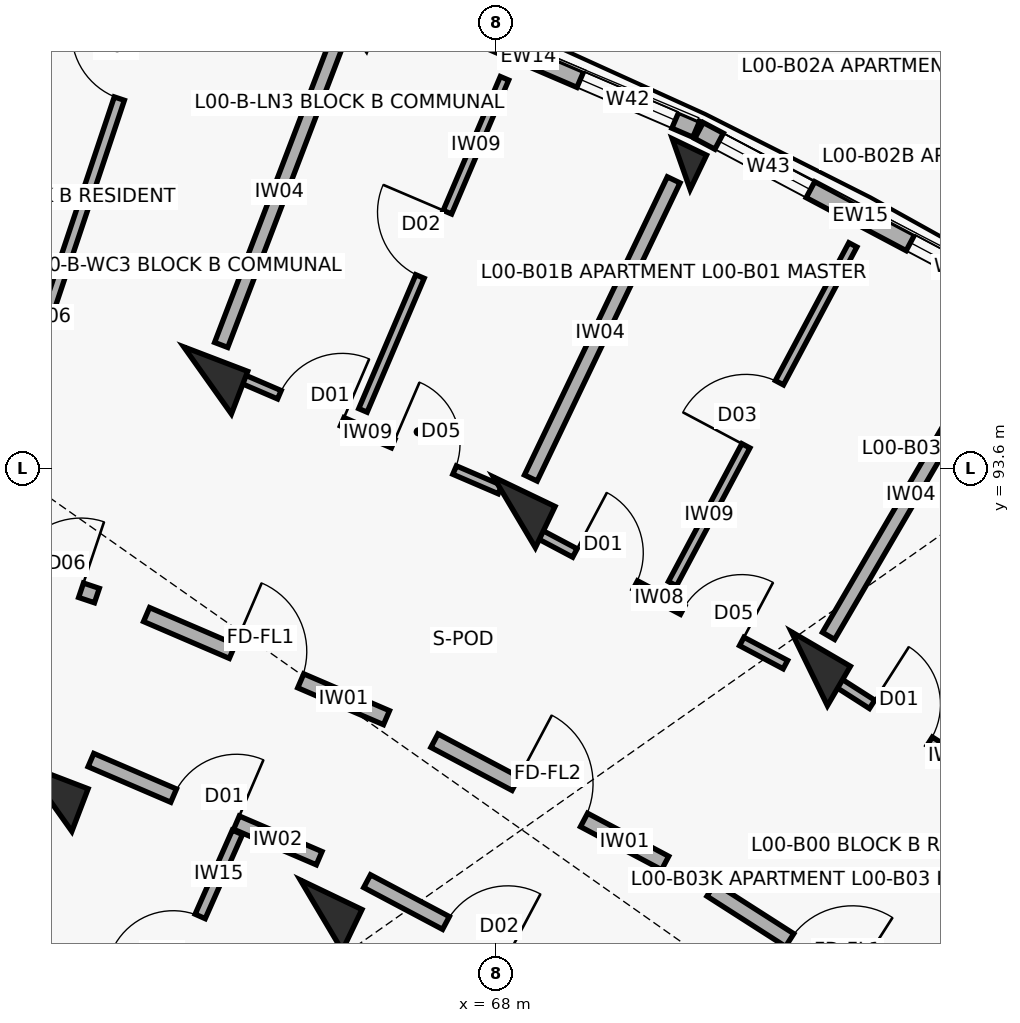
"""IFC4 building model, lengths in metres.
Left out: names, types, materials, properties, quantities, classifications, styles, units other than length and angle.
Written with IfcOpenShell. Run it as: python <this file> out.ifc"""

import sys

from ifc_helpers import new_model, si_unit, direction, frame, frame_2d, origin, origin_2d, place, context, subcontext, project, spatial, rectangle, extrude, element, fill, save


model = new_model("IFC4")
c1 = context("Model", 3, precision=1e-05, world=origin(), true_north=direction((0.0, 1.0)))
c2 = subcontext(c1, "Body", "Model", "MODEL_VIEW")
j1 = project(units=[si_unit("LENGTHUNIT", "METRE"), si_unit("PLANEANGLEUNIT", "RADIAN")], contexts=[c1])
p1 = place(None, origin())
s1 = spatial("IfcSite", under=j1, at=p1, CompositionType="ELEMENT")
p2 = place(p1, origin())
s2 = spatial("IfcBuilding", under=s1, at=p2, CompositionType="ELEMENT")
p3 = place(p2, origin())
s3 = spatial("IfcBuildingStorey", under=s2, at=p3, CompositionType="ELEMENT", Elevation=0.0)
for number, where, z_axis, x_axis in (
    (1, (62.111, 89.261, 0.0), (0.0, 0.0, 1.0), (0.357, 0.934, 0.0)),
    (2, (64.21, 94.753, 0.0), (0.0, 0.0, 1.0), (0.357, 0.934, 0.0)),
    (3, (65.706, 87.716, 0.0), (0.0, 0.0, 1.0), (0.432, 0.902, 0.0)),
    (4, (68.246, 93.019, 0.0), (0.0, 0.0, 1.0), (0.432, 0.902, 0.0)),
):
    element("IfcColumn", number, at=place(p3, frame(where, z_axis=z_axis, x_axis=x_axis)), inside=s3, PredefinedType="COLUMN", context=c2, shape_type="SweptSolid", body=[
        extrude(rectangle(XDim=0.6, YDim=0.9, at=origin_2d()), origin(), (0.0, 0.0, 1.0), 4.5),
    ])
p4 = place(p3, frame((70.441, 97.6, 0.0), z_axis=(0.0, 0.0, 1.0), x_axis=(0.432085748802, 0.901832526405, 0.0)))
e5 = element("IfcColumn", 5, at=p4, inside=s3, PredefinedType="COLUMN", context=c2, shape_type="SweptSolid", body=[
    extrude(rectangle(XDim=0.5, YDim=0.5, at=origin_2d()), origin(), (0.0, 0.0, 1.0), 4.5),
])
p5 = place(p3, frame((72.127, 90.96, 0.0), z_axis=(0.0, 0.0, 1.0), x_axis=(0.504226211181, 0.863571611366, 0.0)))
e6 = element("IfcColumn", 6, at=p5, inside=s3, PredefinedType="COLUMN", context=c2, shape_type="SweptSolid", body=[
    extrude(rectangle(XDim=0.6, YDim=0.9, at=origin_2d()), origin(), (0.0, 0.0, 1.0), 4.5),
])
p6 = place(p3, frame((66.221, 99.958, 0.0), z_axis=(0.0, 0.0, 1.0), x_axis=(0.918711189033, -0.394930058548, 0.0)))
e7 = element("IfcWall", 7, at=p6, inside=s3, PredefinedType="SOLIDWALL", context=c2, shape_type="SweptSolid", body=[
    extrude(rectangle(XDim=4.809, YDim=0.228, at=frame_2d((2.404, 0.0))), origin(), (0.0, 0.0, 1.0), 3.45),
])
p7 = place(p6, frame((0.3, 0.0, 0.3)))
e8 = element("IfcOpeningElement", 8, at=p7, cuts=e7, PredefinedType="OPENING", context=c2, shape_type="SweptSolid", body=[
    extrude(rectangle(XDim=1.36, YDim=1.28, at=frame_2d((0.68, 0.64))), frame((0.0, 0.124, 0.0), z_axis=(0.0, -1.0, 0.0), x_axis=(1.0, 0.0, 0.0)), (0.0, 0.0, 1.0), 0.248),
])
p8 = place(p6, frame((3.149, 0.0, 0.3)))
e9 = element("IfcOpeningElement", 9, at=p8, cuts=e7, PredefinedType="OPENING", context=c2, shape_type="SweptSolid", body=[
    extrude(rectangle(XDim=1.36, YDim=1.28, at=frame_2d((0.68, 0.64))), frame((0.0, 0.124, 0.0), z_axis=(0.0, -1.0, 0.0), x_axis=(1.0, 0.0, 0.0)), (0.0, 0.0, 1.0), 0.248),
])
p9 = place(p3, frame((70.675, 98.042, 0.0), z_axis=(0.0, 0.0, 1.0), x_axis=(0.883448093208, -0.468529045639, 0.0)))
e10 = element("IfcWall", 10, at=p9, inside=s3, PredefinedType="SOLIDWALL", context=c2, shape_type="SweptSolid", body=[
    extrude(rectangle(XDim=4.809, YDim=0.238, at=frame_2d((2.405, 0.0))), origin(), (0.0, 0.0, 1.0), 3.45),
])
p10 = place(p9, frame((0.3, 0.0, 0.3)))
e11 = element("IfcOpeningElement", 11, at=p10, cuts=e10, PredefinedType="OPENING", context=c2, shape_type="SweptSolid", body=[
    extrude(rectangle(XDim=1.36, YDim=1.42, at=frame_2d((0.68, 0.71))), frame((0.0, 0.129, 0.0), z_axis=(0.0, -1.0, 0.0), x_axis=(1.0, 0.0, 0.0)), (0.0, 0.0, 1.0), 0.258),
])
p11 = place(p9, frame((3.149, 0.0, 0.3)))
e12 = element("IfcOpeningElement", 12, at=p11, cuts=e10, PredefinedType="OPENING", context=c2, shape_type="SweptSolid", body=[
    extrude(rectangle(XDim=1.36, YDim=1.42, at=frame_2d((0.68, 0.71))), frame((0.0, 0.129, 0.0), z_axis=(0.0, -1.0, 0.0), x_axis=(1.0, 0.0, 0.0)), (0.0, 0.0, 1.0), 0.258),
])
p12 = place(p3, frame((59.497, 93.018, 0.0), z_axis=(0.0, 0.0, 1.0), x_axis=(0.947863007629, -0.318678080151, 0.0)))
e13 = element("IfcWall", 13, at=p12, inside=s3, PredefinedType="SOLIDWALL", context=c2, shape_type="SweptSolid", body=[
    extrude(rectangle(XDim=3.436, YDim=0.2, at=frame_2d((1.718, 0.0))), origin(), (0.0, 0.0, 1.0), 3.34),
])
p13 = place(p12, frame((0.28, 0.0, 0.0)))
e14 = element("IfcOpeningElement", 14, at=p13, cuts=e13, PredefinedType="OPENING", context=c2, shape_type="SweptSolid", body=[
    extrude(rectangle(XDim=1.12, YDim=2.15, at=frame_2d((0.56, 1.075))), frame((0.0, 0.11, 0.0), z_axis=(0.0, -1.0, 0.0), x_axis=(1.0, 0.0, 0.0)), (0.0, 0.0, 1.0), 0.22),
])
p14 = place(p12, frame((2.266, 0.0, 0.0)))
e15 = element("IfcOpeningElement", 15, at=p14, cuts=e13, PredefinedType="OPENING", context=c2, shape_type="SweptSolid", body=[
    extrude(rectangle(XDim=0.95, YDim=2.1, at=frame_2d((0.475, 1.05))), frame((0.0, 0.11, 0.0), z_axis=(0.0, -1.0, 0.0), x_axis=(1.0, 0.0, 0.0)), (0.0, 0.0, 1.0), 0.22),
])
p15 = place(p3, frame((61.13, 92.724, 0.0), z_axis=(0.0, 0.0, 1.0), x_axis=(0.317204178278, 0.948357268798, 0.0)))
e16 = element("IfcWall", 16, at=p15, inside=s3, PredefinedType="PARTITIONING", context=c2, shape_type="SweptSolid", body=[
    extrude(rectangle(XDim=7.95, YDim=0.14, at=frame_2d((3.975, 0.0))), origin(), (0.0, 0.0, 1.0), 3.34),
])
p16 = place(p15, frame((6.05, 0.0, 0.0)))
e17 = element("IfcOpeningElement", 17, at=p16, cuts=e16, PredefinedType="OPENING", context=c2, shape_type="SweptSolid", body=[
    extrude(rectangle(XDim=0.92, YDim=2.1, at=frame_2d((0.46, 1.05))), frame((0.0, 0.08, 0.0), z_axis=(0.0, -1.0, 0.0), x_axis=(1.0, 0.0, 0.0)), (0.0, 0.0, 1.0), 0.16),
])
p17 = place(p3, frame((63.407, 91.673, 0.0), z_axis=(0.0, 0.0, 1.0), x_axis=(0.918718172399, -0.394913813008, 0.0)))
e18 = element("IfcWall", 18, at=p17, inside=s3, PredefinedType="SOLIDWALL", context=c2, shape_type="SweptSolid", body=[
    extrude(rectangle(XDim=3.436, YDim=0.2, at=frame_2d((1.718, 0.0))), origin(), (0.0, 0.0, 1.0), 3.34),
])
p18 = place(p17, frame((1.228, 0.0, 0.0)))
e19 = element("IfcOpeningElement", 19, at=p18, cuts=e18, PredefinedType="OPENING", context=c2, shape_type="SweptSolid", body=[
    extrude(rectangle(XDim=0.98, YDim=2.15, at=frame_2d((0.49, 1.075))), frame((0.0, 0.11, 0.0), z_axis=(0.0, -1.0, 0.0), x_axis=(1.0, 0.0, 0.0)), (0.0, 0.0, 1.0), 0.22),
])
p19 = place(p3, frame((62.675, 89.758, 0.0), z_axis=(0.0, 0.0, 1.0), x_axis=(0.918723391052, -0.394901672235, 0.0)))
e20 = element("IfcWall", 20, at=p19, inside=s3, PredefinedType="SOLIDWALL", context=c2, shape_type="SweptSolid", body=[
    extrude(rectangle(XDim=3.269, YDim=0.19, at=frame_2d((1.634, 0.0))), origin(), (0.0, 0.0, 1.0), 3.34),
])
p20 = place(p19, frame((1.184, 0.0, 0.0)))
e21 = element("IfcOpeningElement", 21, at=p20, cuts=e20, PredefinedType="OPENING", context=c2, shape_type="SweptSolid", body=[
    extrude(rectangle(XDim=0.9, YDim=2.1, at=frame_2d((0.45, 1.05))), frame((0.0, 0.105, 0.0), z_axis=(0.0, -1.0, 0.0), x_axis=(1.0, 0.0, 0.0)), (0.0, 0.0, 1.0), 0.21),
])
p21 = place(p3, frame((63.267, 85.79, 0.0), z_axis=(0.0, 0.0, 1.0), x_axis=(0.404545283439, 0.91451796792, 0.0)))
e22 = element("IfcWall", 22, at=p21, inside=s3, PredefinedType="PARTITIONING", context=c2, shape_type="SweptSolid", body=[
    extrude(rectangle(XDim=3.3, YDim=0.145, at=frame_2d((1.65, 0.0))), origin(), (0.0, 0.0, 1.0), 3.34),
])
p22 = place(p21, frame((1.21, 0.0, 0.0)))
e23 = element("IfcOpeningElement", 23, at=p22, cuts=e22, PredefinedType="OPENING", context=c2, shape_type="SweptSolid", body=[
    extrude(rectangle(XDim=0.88, YDim=2.1, at=frame_2d((0.44, 1.05))), frame((0.0, 0.083, 0.0), z_axis=(0.0, -1.0, 0.0), x_axis=(1.0, 0.0, 0.0)), (0.0, 0.0, 1.0), 0.165),
])
p23 = place(p3, frame((64.557, 94.822, 0.0), z_axis=(0.0, 0.0, 1.0), x_axis=(0.918726854017, -0.394893615684, 0.0)))
e24 = element("IfcWall", 24, at=p23, inside=s3, PredefinedType="PARTITIONING", context=c2, shape_type="SweptSolid", body=[
    extrude(rectangle(XDim=3.81, YDim=0.12, at=frame_2d((1.905, 0.0))), origin(), (0.0, 0.0, 1.0), 3.34),
])
p24 = place(p23, frame((0.65, 0.0, 0.0)))
e25 = element("IfcOpeningElement", 25, at=p24, cuts=e24, PredefinedType="OPENING", context=c2, shape_type="SweptSolid", body=[
    extrude(rectangle(XDim=0.9, YDim=2.1, at=frame_2d((0.45, 1.05))), frame((0.0, 0.07, 0.0), z_axis=(0.0, -1.0, 0.0), x_axis=(1.0, 0.0, 0.0)), (0.0, 0.0, 1.0), 0.14),
])
p25 = place(p23, frame((2.28, 0.0, 0.0)))
e26 = element("IfcOpeningElement", 26, at=p25, cuts=e24, PredefinedType="OPENING", context=c2, shape_type="SweptSolid", body=[
    extrude(rectangle(XDim=0.88, YDim=2.1, at=frame_2d((0.44, 1.05))), frame((0.0, 0.07, 0.0), z_axis=(0.0, -1.0, 0.0), x_axis=(1.0, 0.0, 0.0)), (0.0, 0.0, 1.0), 0.14),
])
p26 = place(p3, frame((66.253, 94.359, 0.0), z_axis=(0.0, 0.0, 1.0), x_axis=(0.392156908456, 0.919898341748, 0.0)))
e27 = element("IfcWall", 27, at=p26, inside=s3, PredefinedType="PARTITIONING", context=c2, shape_type="SweptSolid", body=[
    extrude(rectangle(XDim=4.75, YDim=0.12, at=frame_2d((2.375, 0.0))), origin(), (0.0, 0.0, 1.0), 3.34),
])
p27 = place(p26, frame((1.915, 0.0, 0.0)))
e28 = element("IfcOpeningElement", 28, at=p27, cuts=e27, PredefinedType="OPENING", context=c2, shape_type="SweptSolid", body=[
    extrude(rectangle(XDim=0.92, YDim=2.1, at=frame_2d((0.46, 1.05))), frame((0.0, 0.07, 0.0), z_axis=(0.0, -1.0, 0.0), x_axis=(1.0, 0.0, 0.0)), (0.0, 0.0, 1.0), 0.14),
])
p28 = place(p3, frame((64.389, 95.22, 0.0), z_axis=(0.0, 0.0, 1.0), x_axis=(0.357064016205, 0.934079915388, 0.0)))
e29 = element("IfcWall", 29, at=p28, inside=s3, PredefinedType="SOLIDWALL", context=c2, shape_type="SweptSolid", body=[
    extrude(rectangle(XDim=4.35, YDim=0.185, at=frame_2d((2.175, 0.0))), origin(), (0.0, 0.0, 1.0), 3.34),
])
p29 = place(p3, frame((67.194, 90.014, 0.0), z_axis=(0.0, 0.0, 1.0), x_axis=(0.883410853063, -0.468599258099, 0.0)))
e30 = element("IfcWall", 30, at=p29, inside=s3, PredefinedType="SOLIDWALL", context=c2, shape_type="SweptSolid", body=[
    extrude(rectangle(XDim=3.436, YDim=0.2, at=frame_2d((1.718, 0.0))), origin(), (0.0, 0.0, 1.0), 3.34),
])
p30 = place(p29, frame((1.208, 0.0, 0.0)))
e31 = element("IfcOpeningElement", 31, at=p30, cuts=e30, PredefinedType="OPENING", context=c2, shape_type="SweptSolid", body=[
    extrude(rectangle(XDim=1.02, YDim=2.15, at=frame_2d((0.51, 1.075))), frame((0.0, 0.11, 0.0), z_axis=(0.0, -1.0, 0.0), x_axis=(1.0, 0.0, 0.0)), (0.0, 0.0, 1.0), 0.22),
])
p31 = place(p3, frame((66.309, 88.165, 0.0), z_axis=(0.0, 0.0, 1.0), x_axis=(0.883444301944, -0.468536194293, 0.0)))
e32 = element("IfcWall", 32, at=p31, inside=s3, PredefinedType="SOLIDWALL", context=c2, shape_type="SweptSolid", body=[
    extrude(rectangle(XDim=3.269, YDim=0.19, at=frame_2d((1.634, 0.0))), origin(), (0.0, 0.0, 1.0), 3.34),
])
p32 = place(p31, frame((1.174, 0.0, 0.0)))
e33 = element("IfcOpeningElement", 33, at=p32, cuts=e32, PredefinedType="OPENING", context=c2, shape_type="SweptSolid", body=[
    extrude(rectangle(XDim=0.92, YDim=2.1, at=frame_2d((0.46, 1.05))), frame((0.0, 0.105, 0.0), z_axis=(0.0, -1.0, 0.0), x_axis=(1.0, 0.0, 0.0)), (0.0, 0.0, 1.0), 0.21),
])
p33 = place(p3, frame((68.468, 92.788, 0.0), z_axis=(0.0, 0.0, 1.0), x_axis=(0.883450371448, -0.468524749814, 0.0)))
e34 = element("IfcWall", 34, at=p33, inside=s3, PredefinedType="PARTITIONING", context=c2, shape_type="SweptSolid", body=[
    extrude(rectangle(XDim=3.785, YDim=0.125, at=frame_2d((1.893, 0.0))), origin(), (0.0, 0.0, 1.0), 3.34),
])
p34 = place(p33, frame((0.65, 0.0, 0.0)))
e35 = element("IfcOpeningElement", 35, at=p34, cuts=e34, PredefinedType="OPENING", context=c2, shape_type="SweptSolid", body=[
    extrude(rectangle(XDim=0.9, YDim=2.1, at=frame_2d((0.45, 1.05))), frame((0.0, 0.073, 0.0), z_axis=(0.0, -1.0, 0.0), x_axis=(1.0, 0.0, 0.0)), (0.0, 0.0, 1.0), 0.145),
])
p35 = place(p33, frame((2.255, 0.0, 0.0)))
e36 = element("IfcOpeningElement", 36, at=p35, cuts=e34, PredefinedType="OPENING", context=c2, shape_type="SweptSolid", body=[
    extrude(rectangle(XDim=0.88, YDim=2.1, at=frame_2d((0.44, 1.05))), frame((0.0, 0.073, 0.0), z_axis=(0.0, -1.0, 0.0), x_axis=(1.0, 0.0, 0.0)), (0.0, 0.0, 1.0), 0.145),
])
p36 = place(p3, frame((70.326, 92.079, 0.0), z_axis=(0.0, 0.0, 1.0), x_axis=(0.469847866249, 0.882747405876, 0.0)))
e37 = element("IfcWall", 37, at=p36, inside=s3, PredefinedType="PARTITIONING", context=c2, shape_type="SweptSolid", body=[
    extrude(rectangle(XDim=5.05, YDim=0.12, at=frame_2d((2.525, 0.0))), origin(), (0.0, 0.0, 1.0), 3.34),
])
p37 = place(p36, frame((2.055, 0.0, 0.0)))
e38 = element("IfcOpeningElement", 38, at=p37, cuts=e37, PredefinedType="OPENING", context=c2, shape_type="SweptSolid", body=[
    extrude(rectangle(XDim=0.94, YDim=2.1, at=frame_2d((0.47, 1.05))), frame((0.0, 0.07, 0.0), z_axis=(0.0, -1.0, 0.0), x_axis=(1.0, 0.0, 0.0)), (0.0, 0.0, 1.0), 0.14),
])
p38 = place(p3, frame((68.462, 93.469, 0.0), z_axis=(0.0, 0.0, 1.0), x_axis=(0.432086898897, 0.901831975371, 0.0)))
e39 = element("IfcWall", 39, at=p38, inside=s3, PredefinedType="SOLIDWALL", context=c2, shape_type="SweptSolid", body=[
    extrude(rectangle(XDim=4.35, YDim=0.185, at=frame_2d((2.175, 0.0))), origin(), (0.0, 0.0, 1.0), 3.34),
])
p39 = place(p3, frame((70.834, 88.051, 0.0), z_axis=(0.0, 0.0, 1.0), x_axis=(0.842257205985, -0.539075874963, 0.0)))
e40 = element("IfcWall", 40, at=p39, inside=s3, PredefinedType="SOLIDWALL", context=c2, shape_type="SweptSolid", body=[
    extrude(rectangle(XDim=3.436, YDim=0.2, at=frame_2d((1.718, 0.0))), origin(), (0.0, 0.0, 1.0), 3.34),
])
p40 = place(p39, frame((1.228, 0.0, 0.0)))
e41 = element("IfcOpeningElement", 41, at=p40, cuts=e40, PredefinedType="OPENING", context=c2, shape_type="SweptSolid", body=[
    extrude(rectangle(XDim=0.98, YDim=2.15, at=frame_2d((0.49, 1.075))), frame((0.0, 0.11, 0.0), z_axis=(0.0, -1.0, 0.0), x_axis=(1.0, 0.0, 0.0)), (0.0, 0.0, 1.0), 0.22),
])
p41 = place(p3, frame((72.405, 90.842, 0.0), z_axis=(0.0, 0.0, 1.0), x_axis=(0.842271400662, -0.539053696423, 0.0)))
e42 = element("IfcWall", 42, at=p41, inside=s3, PredefinedType="PARTITIONING", context=c2, shape_type="SweptSolid", body=[
    extrude(rectangle(XDim=3.797, YDim=0.13, at=frame_2d((1.898, 0.0))), origin(), (0.0, 0.0, 1.0), 3.34),
])
p42 = place(p41, frame((0.65, 0.0, 0.0)))
e43 = element("IfcOpeningElement", 43, at=p42, cuts=e42, PredefinedType="OPENING", context=c2, shape_type="SweptSolid", body=[
    extrude(rectangle(XDim=0.9, YDim=2.1, at=frame_2d((0.45, 1.05))), frame((0.0, 0.075, 0.0), z_axis=(0.0, -1.0, 0.0), x_axis=(1.0, 0.0, 0.0)), (0.0, 0.0, 1.0), 0.15),
])
p43 = place(p41, frame((2.267, 0.0, 0.0)))
e44 = element("IfcOpeningElement", 44, at=p43, cuts=e42, PredefinedType="OPENING", context=c2, shape_type="SweptSolid", body=[
    extrude(rectangle(XDim=0.88, YDim=2.1, at=frame_2d((0.44, 1.05))), frame((0.0, 0.075, 0.0), z_axis=(0.0, -1.0, 0.0), x_axis=(1.0, 0.0, 0.0)), (0.0, 0.0, 1.0), 0.15),
])
p44 = place(p3, frame((72.379, 91.392, 0.0), z_axis=(0.0, 0.0, 1.0), x_axis=(0.504216452091, 0.863577309475, 0.0)))
e45 = element("IfcWall", 45, at=p44, inside=s3, PredefinedType="SOLIDWALL", context=c2, shape_type="SweptSolid", body=[
    extrude(rectangle(XDim=4.35, YDim=0.185, at=frame_2d((2.175, 0.0))), origin(), (0.0, 0.0, 1.0), 3.34),
])
p45 = place(p8, origin())
e46 = element("IfcWindow", 46, at=p45, inside=s3, PartitioningType="DOUBLE_PANEL_VERTICAL", PredefinedType="WINDOW", context=c2, shape_type="SweptSolid", body=[
    extrude(rectangle(XDim=1.36, YDim=1.28, at=frame_2d((0.68, 0.64))), frame((0.0, 0.03, 0.0), z_axis=(0.0, -1.0, 0.0), x_axis=(1.0, 0.0, 0.0)), (0.0, 0.0, 1.0), 0.06),
])
fill(e9, e46)
p46 = place(p10, origin())
e47 = element("IfcWindow", 47, at=p46, inside=s3, PartitioningType="DOUBLE_PANEL_VERTICAL", PredefinedType="WINDOW", context=c2, shape_type="SweptSolid", body=[
    extrude(rectangle(XDim=1.36, YDim=1.42, at=frame_2d((0.68, 0.71))), frame((0.0, 0.03, 0.0), z_axis=(0.0, -1.0, 0.0), x_axis=(1.0, 0.0, 0.0)), (0.0, 0.0, 1.0), 0.06),
])
fill(e11, e47)
p47 = place(p11, origin())
e48 = element("IfcWindow", 48, at=p47, inside=s3, PartitioningType="DOUBLE_PANEL_VERTICAL", PredefinedType="WINDOW", context=c2, shape_type="SweptSolid", body=[
    extrude(rectangle(XDim=1.36, YDim=1.42, at=frame_2d((0.68, 0.71))), frame((0.0, 0.03, 0.0), z_axis=(0.0, -1.0, 0.0), x_axis=(1.0, 0.0, 0.0)), (0.0, 0.0, 1.0), 0.06),
])
fill(e12, e48)
p48 = place(p14, origin())
e49 = element("IfcDoor", 49, at=p48, inside=s3, OperationType="SINGLE_SWING_RIGHT", PredefinedType="DOOR", context=c2, shape_type="SweptSolid", body=[
    extrude(rectangle(XDim=0.95, YDim=2.1, at=frame_2d((0.475, 1.05))), frame((0.0, 0.025, 0.0), z_axis=(0.0, -1.0, 0.0), x_axis=(1.0, 0.0, 0.0)), (0.0, 0.0, 1.0), 0.05),
])
fill(e15, e49)
p49 = place(p16, origin())
e50 = element("IfcDoor", 50, at=p49, inside=s3, OperationType="SINGLE_SWING_RIGHT", PredefinedType="DOOR", context=c2, shape_type="SweptSolid", body=[
    extrude(rectangle(XDim=0.92, YDim=2.1, at=frame_2d((0.46, 1.05))), frame((0.0, 0.025, 0.0), z_axis=(0.0, -1.0, 0.0), x_axis=(1.0, 0.0, 0.0)), (0.0, 0.0, 1.0), 0.05),
])
fill(e17, e50)
p50 = place(p18, origin())
e51 = element("IfcDoor", 51, at=p50, inside=s3, OperationType="SINGLE_SWING_LEFT", PredefinedType="DOOR", context=c2, shape_type="SweptSolid", body=[
    extrude(rectangle(XDim=0.98, YDim=2.15, at=frame_2d((0.49, 1.075))), frame((0.0, 0.025, 0.0), z_axis=(0.0, -1.0, 0.0), x_axis=(1.0, 0.0, 0.0)), (0.0, 0.0, 1.0), 0.05),
])
fill(e19, e51)
p51 = place(p20, origin())
e52 = element("IfcDoor", 52, at=p51, inside=s3, OperationType="SINGLE_SWING_RIGHT", PredefinedType="DOOR", context=c2, shape_type="SweptSolid", body=[
    extrude(rectangle(XDim=0.9, YDim=2.1, at=frame_2d((0.45, 1.05))), frame((0.0, 0.025, 0.0), z_axis=(0.0, -1.0, 0.0), x_axis=(1.0, 0.0, 0.0)), (0.0, 0.0, 1.0), 0.05),
])
fill(e21, e52)
p52 = place(p22, origin())
e53 = element("IfcDoor", 53, at=p52, inside=s3, OperationType="SINGLE_SWING_LEFT", PredefinedType="DOOR", context=c2, shape_type="SweptSolid", body=[
    extrude(rectangle(XDim=0.88, YDim=2.1, at=frame_2d((0.44, 1.05))), frame((0.0, 0.025, 0.0), z_axis=(0.0, -1.0, 0.0), x_axis=(1.0, 0.0, 0.0)), (0.0, 0.0, 1.0), 0.05),
])
fill(e23, e53)
p53 = place(p24, origin())
e54 = element("IfcDoor", 54, at=p53, inside=s3, OperationType="SINGLE_SWING_RIGHT", PredefinedType="DOOR", context=c2, shape_type="SweptSolid", body=[
    extrude(rectangle(XDim=0.9, YDim=2.1, at=frame_2d((0.45, 1.05))), frame((0.0, 0.025, 0.0), z_axis=(0.0, -1.0, 0.0), x_axis=(1.0, 0.0, 0.0)), (0.0, 0.0, 1.0), 0.05),
])
fill(e25, e54)
p54 = place(p25, origin())
e55 = element("IfcDoor", 55, at=p54, inside=s3, OperationType="SINGLE_SWING_LEFT", PredefinedType="DOOR", context=c2, shape_type="SweptSolid", body=[
    extrude(rectangle(XDim=0.88, YDim=2.1, at=frame_2d((0.44, 1.05))), frame((0.0, 0.025, 0.0), z_axis=(0.0, -1.0, 0.0), x_axis=(1.0, 0.0, 0.0)), (0.0, 0.0, 1.0), 0.05),
])
fill(e26, e55)
p55 = place(p27, origin())
e56 = element("IfcDoor", 56, at=p55, inside=s3, OperationType="SINGLE_SWING_RIGHT", PredefinedType="DOOR", context=c2, shape_type="SweptSolid", body=[
    extrude(rectangle(XDim=0.92, YDim=2.1, at=frame_2d((0.46, 1.05))), frame((0.0, 0.025, 0.0), z_axis=(0.0, -1.0, 0.0), x_axis=(1.0, 0.0, 0.0)), (0.0, 0.0, 1.0), 0.05),
])
fill(e28, e56)
p56 = place(p30, origin())
e57 = element("IfcDoor", 57, at=p56, inside=s3, OperationType="SINGLE_SWING_LEFT", PredefinedType="DOOR", context=c2, shape_type="SweptSolid", body=[
    extrude(rectangle(XDim=1.02, YDim=2.15, at=frame_2d((0.51, 1.075))), frame((0.0, 0.025, 0.0), z_axis=(0.0, -1.0, 0.0), x_axis=(1.0, 0.0, 0.0)), (0.0, 0.0, 1.0), 0.05),
])
fill(e31, e57)
p57 = place(p32, origin())
e58 = element("IfcDoor", 58, at=p57, inside=s3, OperationType="SINGLE_SWING_RIGHT", PredefinedType="DOOR", context=c2, shape_type="SweptSolid", body=[
    extrude(rectangle(XDim=0.92, YDim=2.1, at=frame_2d((0.46, 1.05))), frame((0.0, 0.025, 0.0), z_axis=(0.0, -1.0, 0.0), x_axis=(1.0, 0.0, 0.0)), (0.0, 0.0, 1.0), 0.05),
])
fill(e33, e58)
p58 = place(p34, origin())
e59 = element("IfcDoor", 59, at=p58, inside=s3, OperationType="SINGLE_SWING_LEFT", PredefinedType="DOOR", context=c2, shape_type="SweptSolid", body=[
    extrude(rectangle(XDim=0.9, YDim=2.1, at=frame_2d((0.45, 1.05))), frame((0.0, 0.025, 0.0), z_axis=(0.0, -1.0, 0.0), x_axis=(1.0, 0.0, 0.0)), (0.0, 0.0, 1.0), 0.05),
])
fill(e35, e59)
p59 = place(p35, origin())
e60 = element("IfcDoor", 60, at=p59, inside=s3, OperationType="SINGLE_SWING_RIGHT", PredefinedType="DOOR", context=c2, shape_type="SweptSolid", body=[
    extrude(rectangle(XDim=0.88, YDim=2.1, at=frame_2d((0.44, 1.05))), frame((0.0, 0.025, 0.0), z_axis=(0.0, -1.0, 0.0), x_axis=(1.0, 0.0, 0.0)), (0.0, 0.0, 1.0), 0.05),
])
fill(e36, e60)
p60 = place(p37, origin())
e61 = element("IfcDoor", 61, at=p60, inside=s3, OperationType="SINGLE_SWING_LEFT", PredefinedType="DOOR", context=c2, shape_type="SweptSolid", body=[
    extrude(rectangle(XDim=0.94, YDim=2.1, at=frame_2d((0.47, 1.05))), frame((0.0, 0.025, 0.0), z_axis=(0.0, -1.0, 0.0), x_axis=(1.0, 0.0, 0.0)), (0.0, 0.0, 1.0), 0.05),
])
fill(e38, e61)
p61 = place(p40, origin())
e62 = element("IfcDoor", 62, at=p61, inside=s3, OperationType="SINGLE_SWING_RIGHT", PredefinedType="DOOR", context=c2, shape_type="SweptSolid", body=[
    extrude(rectangle(XDim=0.98, YDim=2.15, at=frame_2d((0.49, 1.075))), frame((0.0, 0.025, 0.0), z_axis=(0.0, -1.0, 0.0), x_axis=(1.0, 0.0, 0.0)), (0.0, 0.0, 1.0), 0.05),
])
fill(e41, e62)
p62 = place(p42, origin())
e63 = element("IfcDoor", 63, at=p62, inside=s3, OperationType="SINGLE_SWING_LEFT", PredefinedType="DOOR", context=c2, shape_type="SweptSolid", body=[
    extrude(rectangle(XDim=0.9, YDim=2.1, at=frame_2d((0.45, 1.05))), frame((0.0, 0.025, 0.0), z_axis=(0.0, -1.0, 0.0), x_axis=(1.0, 0.0, 0.0)), (0.0, 0.0, 1.0), 0.05),
])
fill(e43, e63)
save(model, sys.argv[1])
